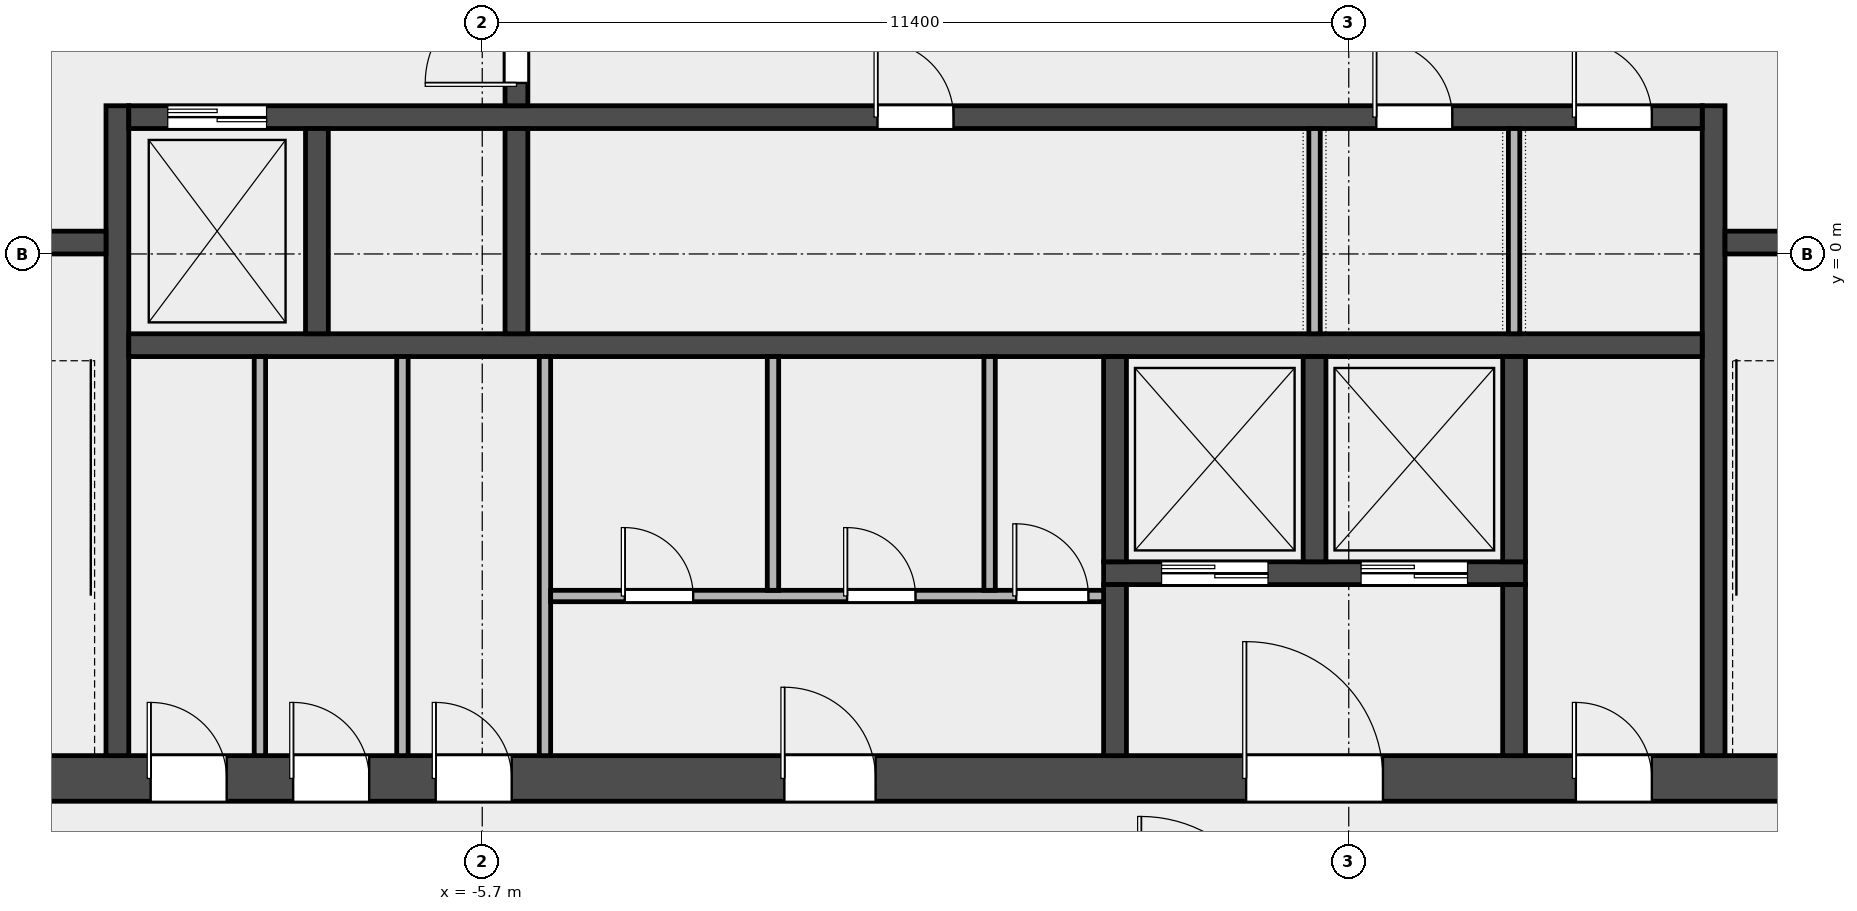
"""IFC4 building model, lengths in metres.
Left out: names, types, materials, properties, quantities, classifications, styles, units other than length and angle.
Written with IfcOpenShell. Run it as: python <this file> out.ifc"""

import sys

from ifc_helpers import new_model, si_unit, direction, frame, frame_2d, origin, place, context, subcontext, project, spatial, rectangle, extrude, element, fill, save


model = new_model("IFC4")
c1 = context("Model", 3, precision=1e-05, world=origin(), true_north=direction((0.0, 1.0)))
c2 = subcontext(c1, "Body", "Model", "MODEL_VIEW")
j1 = project(units=[si_unit("LENGTHUNIT", "METRE"), si_unit("PLANEANGLEUNIT", "RADIAN")], contexts=[c1])
p1 = place(None, origin())
s1 = spatial("IfcSite", under=j1, at=p1, CompositionType="ELEMENT")
p2 = place(p1, origin())
s2 = spatial("IfcBuilding", under=s1, at=p2, CompositionType="ELEMENT")
p3 = place(p2, frame((0.0, 0.0, 223.0)))
s3 = spatial("IfcBuildingStorey", under=s2, at=p3, CompositionType="ELEMENT", Elevation=223.0)
p4 = place(p3, frame((-14.4, -6.9, 0.0), z_axis=(0.0, 0.0, 1.0), x_axis=(1.0, 0.0, 0.0)))
e1 = element("IfcWall", 1, at=p4, inside=s3, PredefinedType="SHEAR", context=c2, shape_type="SweptSolid", body=[
    extrude(rectangle(XDim=28.8, YDim=0.6, at=frame_2d((14.4, 0.0))), origin(), (0.0, 0.0, 1.0), 3.7),
])
p5 = place(p4, frame((4.337, 0.0, 0.0)))
e2 = element("IfcOpeningElement", 2, at=p5, cuts=e1, PredefinedType="OPENING", context=c2, shape_type="SweptSolid", body=[
    extrude(rectangle(XDim=1.0, YDim=2.1, at=frame_2d((0.5, 1.05))), frame((0.0, 0.312, 0.0), z_axis=(0.0, -1.0, 0.0), x_axis=(1.0, 0.0, 0.0)), (0.0, 0.0, 1.0), 0.624),
])
p6 = place(p4, frame((6.212, 0.0, 0.0)))
e3 = element("IfcOpeningElement", 3, at=p6, cuts=e1, PredefinedType="OPENING", context=c2, shape_type="SweptSolid", body=[
    extrude(rectangle(XDim=1.0, YDim=2.1, at=frame_2d((0.5, 1.05))), frame((0.0, 0.312, 0.0), z_axis=(0.0, -1.0, 0.0), x_axis=(1.0, 0.0, 0.0)), (0.0, 0.0, 1.0), 0.624),
])
p7 = place(p4, frame((8.087, 0.0, 0.0)))
e4 = element("IfcOpeningElement", 4, at=p7, cuts=e1, PredefinedType="OPENING", context=c2, shape_type="SweptSolid", body=[
    extrude(rectangle(XDim=1.0, YDim=2.1, at=frame_2d((0.5, 1.05))), frame((0.0, 0.312, 0.0), z_axis=(0.0, -1.0, 0.0), x_axis=(1.0, 0.0, 0.0)), (0.0, 0.0, 1.0), 0.624),
])
p8 = place(p4, frame((12.675, 0.0, 0.0)))
e5 = element("IfcOpeningElement", 5, at=p8, cuts=e1, PredefinedType="OPENING", context=c2, shape_type="SweptSolid", body=[
    extrude(rectangle(XDim=1.2, YDim=2.1, at=frame_2d((0.6, 1.05))), frame((0.0, 0.312, 0.0), z_axis=(0.0, -1.0, 0.0), x_axis=(1.0, 0.0, 0.0)), (0.0, 0.0, 1.0), 0.624),
])
p9 = place(p4, frame((18.75, 0.0, 0.0)))
e6 = element("IfcOpeningElement", 6, at=p9, cuts=e1, PredefinedType="OPENING", context=c2, shape_type="SweptSolid", body=[
    extrude(rectangle(XDim=1.8, YDim=2.1, at=frame_2d((0.9, 1.05))), frame((0.0, 0.312, 0.0), z_axis=(0.0, -1.0, 0.0), x_axis=(1.0, 0.0, 0.0)), (0.0, 0.0, 1.0), 0.624),
])
p10 = place(p4, frame((23.087, 0.0, 0.0)))
e7 = element("IfcOpeningElement", 7, at=p10, cuts=e1, PredefinedType="OPENING", context=c2, shape_type="SweptSolid", body=[
    extrude(rectangle(XDim=1.0, YDim=2.1, at=frame_2d((0.5, 1.05))), frame((0.0, 0.312, 0.0), z_axis=(0.0, -1.0, 0.0), x_axis=(1.0, 0.0, 0.0)), (0.0, 0.0, 1.0), 0.624),
])
for number, where, z_axis, x_axis in (
    (8, (-10.5, -6.6, 0.0), (0.0, 0.0, 1.0), (0.0, 1.0, 0.0)),
    (9, (10.5, -6.6, 0.0), (0.0, 0.0, 1.0), (0.0, 1.0, 0.0)),
):
    element("IfcWall", number, at=place(p3, frame(where, z_axis=z_axis, x_axis=x_axis)), inside=s3, PredefinedType="SHEAR", context=c2, shape_type="SweptSolid", body=[
        extrude(rectangle(XDim=8.55, YDim=0.3, at=frame_2d((4.275, 0.0))), origin(), (0.0, 0.0, 1.0), 3.7),
    ])
p11 = place(p3, frame((-13.8, 0.15, 0.0), z_axis=(0.0, 0.0, 1.0), x_axis=(1.0, 0.0, 0.0)))
e10 = element("IfcWall", 10, at=p11, inside=s3, PredefinedType="SOLIDWALL", context=c2, shape_type="SweptSolid", body=[
    extrude(rectangle(XDim=3.15, YDim=0.3, at=frame_2d((1.575, 0.0))), origin(), (0.0, 0.0, 1.0), 3.7),
])
p12 = place(p11, frame((0.975, 0.0, 0.0)))
e11 = element("IfcOpeningElement", 11, at=p12, cuts=e10, PredefinedType="OPENING", context=c2, shape_type="SweptSolid", body=[
    extrude(rectangle(XDim=1.1, YDim=2.1, at=frame_2d((0.55, 1.05))), frame((0.0, 0.162, 0.0), z_axis=(0.0, -1.0, 0.0), x_axis=(1.0, 0.0, 0.0)), (0.0, 0.0, 1.0), 0.324),
])
p13 = place(p3, frame((10.65, 0.15, 0.0), z_axis=(0.0, 0.0, 1.0), x_axis=(1.0, 0.0, 0.0)))
e12 = element("IfcWall", 12, at=p13, inside=s3, PredefinedType="SOLIDWALL", context=c2, shape_type="SweptSolid", body=[
    extrude(rectangle(XDim=3.15, YDim=0.3, at=frame_2d((1.575, 0.0))), origin(), (0.0, 0.0, 1.0), 3.7),
])
p14 = place(p13, frame((1.025, 0.0, 0.0)))
e13 = element("IfcOpeningElement", 13, at=p14, cuts=e12, PredefinedType="OPENING", context=c2, shape_type="SweptSolid", body=[
    extrude(rectangle(XDim=1.1, YDim=2.1, at=frame_2d((0.55, 1.05))), frame((0.0, 0.162, 0.0), z_axis=(0.0, -1.0, 0.0), x_axis=(1.0, 0.0, 0.0)), (0.0, 0.0, 1.0), 0.324),
])
p15 = place(p3, frame((-10.35, -1.2, 0.0), z_axis=(0.0, 0.0, 1.0), x_axis=(1.0, 0.0, 0.0)))
e14 = element("IfcWall", 14, at=p15, inside=s3, PredefinedType="SOLIDWALL", context=c2, shape_type="SweptSolid", body=[
    extrude(rectangle(XDim=20.7, YDim=0.3, at=frame_2d((10.35, 0.0))), origin(), (0.0, 0.0, 1.0), 3.7),
])
p16 = place(p3, frame((-10.35, 1.8, 0.0), z_axis=(0.0, 0.0, 1.0), x_axis=(1.0, 0.0, 0.0)))
e15 = element("IfcWall", 15, at=p16, inside=s3, PredefinedType="SOLIDWALL", context=c2, shape_type="SweptSolid", body=[
    extrude(rectangle(XDim=20.7, YDim=0.3, at=frame_2d((10.35, 0.0))), origin(), (0.0, 0.0, 1.0), 3.7),
])
p17 = place(p16, frame((0.512, 0.0, 0.0)))
e16 = element("IfcOpeningElement", 16, at=p17, cuts=e15, PredefinedType="OPENING", context=c2, shape_type="SweptSolid", body=[
    extrude(rectangle(XDim=1.3, YDim=2.1, at=frame_2d((0.65, 1.05))), frame((0.0, 0.162, 0.0), z_axis=(0.0, -1.0, 0.0), x_axis=(1.0, 0.0, 0.0)), (0.0, 0.0, 1.0), 0.324),
])
p18 = place(p16, frame((9.85, 0.0, 0.0)))
e17 = element("IfcOpeningElement", 17, at=p18, cuts=e15, PredefinedType="OPENING", context=c2, shape_type="SweptSolid", body=[
    extrude(rectangle(XDim=1.0, YDim=2.1, at=frame_2d((0.5, 1.05))), frame((0.0, 0.162, 0.0), z_axis=(0.0, -1.0, 0.0), x_axis=(1.0, 0.0, 0.0)), (0.0, 0.0, 1.0), 0.324),
])
p19 = place(p16, frame((16.413, 0.0, 0.0)))
e18 = element("IfcOpeningElement", 18, at=p19, cuts=e15, PredefinedType="OPENING", context=c2, shape_type="SweptSolid", body=[
    extrude(rectangle(XDim=1.0, YDim=2.1, at=frame_2d((0.5, 1.05))), frame((0.0, 0.162, 0.0), z_axis=(0.0, -1.0, 0.0), x_axis=(1.0, 0.0, 0.0)), (0.0, 0.0, 1.0), 0.324),
])
p20 = place(p16, frame((19.038, 0.0, 0.0)))
e19 = element("IfcOpeningElement", 19, at=p20, cuts=e15, PredefinedType="OPENING", context=c2, shape_type="SweptSolid", body=[
    extrude(rectangle(XDim=1.0, YDim=2.1, at=frame_2d((0.5, 1.05))), frame((0.0, 0.162, 0.0), z_axis=(0.0, -1.0, 0.0), x_axis=(1.0, 0.0, 0.0)), (0.0, 0.0, 1.0), 0.324),
])
for number, where, z_axis, x_axis in (
    (20, (-7.875, -1.05, 0.0), (0.0, 0.0, 1.0), (0.0, 1.0, 0.0)),
    (21, (-5.25, -1.05, 0.0), (0.0, 0.0, 1.0), (0.0, 1.0, 0.0)),
):
    element("IfcWall", number, at=place(p3, frame(where, z_axis=z_axis, x_axis=x_axis)), inside=s3, PredefinedType="SOLIDWALL", context=c2, shape_type="SweptSolid", body=[
        extrude(rectangle(XDim=2.7, YDim=0.3, at=frame_2d((1.35, 0.0))), origin(), (0.0, 0.0, 1.0), 3.7),
    ])
p21 = place(p3, frame((-5.25, 1.95, 0.0), z_axis=(0.0, 0.0, 1.0), x_axis=(0.0, 1.0, 0.0)))
e22 = element("IfcWall", 22, at=p21, inside=s3, PredefinedType="SOLIDWALL", context=c2, shape_type="SweptSolid", body=[
    extrude(rectangle(XDim=3.3, YDim=0.3, at=frame_2d((1.65, 0.0))), origin(), (0.0, 0.0, 1.0), 3.7),
])
p22 = place(p21, frame((0.3, 0.0, 0.0)))
e23 = element("IfcOpeningElement", 23, at=p22, cuts=e22, PredefinedType="OPENING", context=c2, shape_type="SweptSolid", body=[
    extrude(rectangle(XDim=1.2, YDim=2.1, at=frame_2d((0.6, 1.05))), frame((0.0, 0.162, 0.0), z_axis=(0.0, -1.0, 0.0), x_axis=(1.0, 0.0, 0.0)), (0.0, 0.0, 1.0), 0.324),
])
p23 = place(p21, frame((1.8, 0.0, 0.0)))
e24 = element("IfcOpeningElement", 24, at=p23, cuts=e22, PredefinedType="OPENING", context=c2, shape_type="SweptSolid", body=[
    extrude(rectangle(XDim=1.2, YDim=2.1, at=frame_2d((0.6, 1.05))), frame((0.0, 0.162, 0.0), z_axis=(0.0, -1.0, 0.0), x_axis=(1.0, 0.0, 0.0)), (0.0, 0.0, 1.0), 0.324),
])
p24 = place(p3, frame((2.475, -4.2, 0.0), z_axis=(0.0, 0.0, 1.0), x_axis=(1.0, 0.0, 0.0)))
e25 = element("IfcWall", 25, at=p24, inside=s3, PredefinedType="SOLIDWALL", context=c2, shape_type="SweptSolid", body=[
    extrude(rectangle(XDim=5.55, YDim=0.3, at=frame_2d((2.775, 0.0))), origin(), (0.0, 0.0, 1.0), 3.7),
])
p25 = place(p24, frame((0.762, 0.0, 0.0)))
e26 = element("IfcOpeningElement", 26, at=p25, cuts=e25, PredefinedType="OPENING", context=c2, shape_type="SweptSolid", body=[
    extrude(rectangle(XDim=1.4, YDim=2.1, at=frame_2d((0.7, 1.05))), frame((0.0, 0.162, 0.0), z_axis=(0.0, -1.0, 0.0), x_axis=(1.0, 0.0, 0.0)), (0.0, 0.0, 1.0), 0.324),
])
p26 = place(p24, frame((3.387, 0.0, 0.0)))
e27 = element("IfcOpeningElement", 27, at=p26, cuts=e25, PredefinedType="OPENING", context=c2, shape_type="SweptSolid", body=[
    extrude(rectangle(XDim=1.4, YDim=2.1, at=frame_2d((0.7, 1.05))), frame((0.0, 0.162, 0.0), z_axis=(0.0, -1.0, 0.0), x_axis=(1.0, 0.0, 0.0)), (0.0, 0.0, 1.0), 0.324),
])
p27 = place(p3, frame((2.625, -4.05, 0.0), z_axis=(0.0, 0.0, 1.0), x_axis=(0.0, 1.0, 0.0)))
e28 = element("IfcWall", 28, at=p27, inside=s3, PredefinedType="SOLIDWALL", context=c2, shape_type="SweptSolid", body=[
    extrude(rectangle(XDim=2.7, YDim=0.3, at=frame_2d((1.35, 0.0))), origin(), (0.0, 0.0, 1.0), 3.7),
])
p28 = place(p3, frame((2.625, -6.6, 0.0), z_axis=(0.0, 0.0, 1.0), x_axis=(0.0, 1.0, 0.0)))
e29 = element("IfcWall", 29, at=p28, inside=s3, PredefinedType="SOLIDWALL", context=c2, shape_type="SweptSolid", body=[
    extrude(rectangle(XDim=2.25, YDim=0.3, at=frame_2d((1.125, 0.0))), origin(), (0.0, 0.0, 1.0), 3.7),
])
for number, where, z_axis, x_axis in (
    (30, (5.25, -4.05, 0.0), (0.0, 0.0, 1.0), (0.0, 1.0, 0.0)),
    (31, (7.875, -4.05, 0.0), (0.0, 0.0, 1.0), (0.0, 1.0, 0.0)),
):
    element("IfcWall", number, at=place(p3, frame(where, z_axis=z_axis, x_axis=x_axis)), inside=s3, PredefinedType="SOLIDWALL", context=c2, shape_type="SweptSolid", body=[
        extrude(rectangle(XDim=2.7, YDim=0.3, at=frame_2d((1.35, 0.0))), origin(), (0.0, 0.0, 1.0), 3.7),
    ])
p29 = place(p3, frame((7.875, -6.6, 0.0), z_axis=(0.0, 0.0, 1.0), x_axis=(0.0, 1.0, 0.0)))
e32 = element("IfcWall", 32, at=p29, inside=s3, PredefinedType="SOLIDWALL", context=c2, shape_type="SweptSolid", body=[
    extrude(rectangle(XDim=2.25, YDim=0.3, at=frame_2d((1.125, 0.0))), origin(), (0.0, 0.0, 1.0), 3.7),
])
for number, where, z_axis, x_axis in (
    (33, (-8.625, -6.6, 0.0), (0.0, 0.0, 1.0), (0.0, 1.0, 0.0)),
    (34, (-6.75, -6.6, 0.0), (0.0, 0.0, 1.0), (0.0, 1.0, 0.0)),
    (35, (-4.875, -6.6, 0.0), (0.0, 0.0, 1.0), (0.0, 1.0, 0.0)),
):
    element("IfcWall", number, at=place(p3, frame(where, z_axis=z_axis, x_axis=x_axis)), inside=s3, PredefinedType="PARTITIONING", context=c2, shape_type="SweptSolid", body=[
        extrude(rectangle(XDim=5.25, YDim=0.15, at=frame_2d((2.625, 0.0))), origin(), (0.0, 0.0, 1.0), 3.7),
    ])
p30 = place(p3, frame((-4.8, -4.5, 0.0), z_axis=(0.0, 0.0, 1.0), x_axis=(1.0, 0.0, 0.0)))
e36 = element("IfcWall", 36, at=p30, inside=s3, PredefinedType="PARTITIONING", context=c2, shape_type="SweptSolid", body=[
    extrude(rectangle(XDim=7.275, YDim=0.15, at=frame_2d((3.638, 0.0))), origin(), (0.0, 0.0, 1.0), 3.7),
])
p31 = place(p30, frame((0.975, 0.0, 0.0)))
e37 = element("IfcOpeningElement", 37, at=p31, cuts=e36, PredefinedType="OPENING", context=c2, shape_type="SweptSolid", body=[
    extrude(rectangle(XDim=0.9, YDim=2.1, at=frame_2d((0.45, 1.05))), frame((0.0, 0.087, 0.0), z_axis=(0.0, -1.0, 0.0), x_axis=(1.0, 0.0, 0.0)), (0.0, 0.0, 1.0), 0.174),
])
p32 = place(p30, frame((3.9, 0.0, 0.0)))
e38 = element("IfcOpeningElement", 38, at=p32, cuts=e36, PredefinedType="OPENING", context=c2, shape_type="SweptSolid", body=[
    extrude(rectangle(XDim=0.9, YDim=2.1, at=frame_2d((0.45, 1.05))), frame((0.0, 0.087, 0.0), z_axis=(0.0, -1.0, 0.0), x_axis=(1.0, 0.0, 0.0)), (0.0, 0.0, 1.0), 0.174),
])
p33 = place(p30, frame((6.125, 0.0, 0.0)))
e39 = element("IfcOpeningElement", 39, at=p33, cuts=e36, PredefinedType="OPENING", context=c2, shape_type="SweptSolid", body=[
    extrude(rectangle(XDim=0.95, YDim=2.1, at=frame_2d((0.475, 1.05))), frame((0.0, 0.087, 0.0), z_axis=(0.0, -1.0, 0.0), x_axis=(1.0, 0.0, 0.0)), (0.0, 0.0, 1.0), 0.174),
])
for number, where, z_axis, x_axis in (
    (40, (-1.875, -4.425, 0.0), (0.0, 0.0, 1.0), (0.0, 1.0, 0.0)),
    (41, (0.975, -4.425, 0.0), (0.0, 0.0, 1.0), (0.0, 1.0, 0.0)),
):
    element("IfcWall", number, at=place(p3, frame(where, z_axis=z_axis, x_axis=x_axis)), inside=s3, PredefinedType="PARTITIONING", context=c2, shape_type="SweptSolid", body=[
        extrude(rectangle(XDim=3.075, YDim=0.15, at=frame_2d((1.538, 0.0))), origin(), (0.0, 0.0, 1.0), 3.7),
    ])
for number, where, z_axis, x_axis in (
    (42, (5.25, -1.05, 0.0), (0.0, 0.0, 1.0), (0.0, 1.0, 0.0)),
    (43, (7.875, -1.05, 0.0), (0.0, 0.0, 1.0), (0.0, 1.0, 0.0)),
):
    element("IfcWall", number, at=place(p3, frame(where, z_axis=z_axis, x_axis=x_axis)), inside=s3, PredefinedType="PARTITIONING", context=c2, shape_type="SweptSolid", body=[
        extrude(rectangle(XDim=2.7, YDim=0.15, at=frame_2d((1.35, 0.0))), origin(), (0.0, 0.0, 1.0), 3.7),
    ])
p34 = place(p22, origin())
e44 = element("IfcDoor", 44, at=p34, inside=s3, OperationType="SINGLE_SWING_LEFT", PredefinedType="DOOR", context=c2, shape_type="SweptSolid", body=[
    extrude(rectangle(XDim=1.2, YDim=2.1, at=frame_2d((0.6, 1.05))), frame((0.0, 0.025, 0.0), z_axis=(0.0, -1.0, 0.0), x_axis=(1.0, 0.0, 0.0)), (0.0, 0.0, 1.0), 0.05),
])
fill(e23, e44)
p35 = place(p17, origin())
e45 = element("IfcDoor", 45, at=p35, inside=s3, OperationType="DOUBLE_DOOR_SLIDING", PredefinedType="DOOR", context=c2, shape_type="SweptSolid", body=[
    extrude(rectangle(XDim=1.3, YDim=2.1, at=frame_2d((0.65, 1.05))), frame((0.0, 0.025, 0.0), z_axis=(0.0, -1.0, 0.0), x_axis=(1.0, 0.0, 0.0)), (0.0, 0.0, 1.0), 0.05),
])
fill(e16, e45)
p36 = place(p25, origin())
e46 = element("IfcDoor", 46, at=p36, inside=s3, OperationType="DOUBLE_DOOR_SLIDING", PredefinedType="DOOR", context=c2, shape_type="SweptSolid", body=[
    extrude(rectangle(XDim=1.4, YDim=2.1, at=frame_2d((0.7, 1.05))), frame((0.0, 0.025, 0.0), z_axis=(0.0, -1.0, 0.0), x_axis=(1.0, 0.0, 0.0)), (0.0, 0.0, 1.0), 0.05),
])
fill(e26, e46)
p37 = place(p26, origin())
e47 = element("IfcDoor", 47, at=p37, inside=s3, OperationType="DOUBLE_DOOR_SLIDING", PredefinedType="DOOR", context=c2, shape_type="SweptSolid", body=[
    extrude(rectangle(XDim=1.4, YDim=2.1, at=frame_2d((0.7, 1.05))), frame((0.0, 0.025, 0.0), z_axis=(0.0, -1.0, 0.0), x_axis=(1.0, 0.0, 0.0)), (0.0, 0.0, 1.0), 0.05),
])
fill(e27, e47)
p38 = place(p5, origin())
e48 = element("IfcDoor", 48, at=p38, inside=s3, OperationType="SINGLE_SWING_LEFT", PredefinedType="DOOR", context=c2, shape_type="SweptSolid", body=[
    extrude(rectangle(XDim=1.0, YDim=2.1, at=frame_2d((0.5, 1.05))), frame((0.0, 0.025, 0.0), z_axis=(0.0, -1.0, 0.0), x_axis=(1.0, 0.0, 0.0)), (0.0, 0.0, 1.0), 0.05),
])
fill(e2, e48)
p39 = place(p6, origin())
e49 = element("IfcDoor", 49, at=p39, inside=s3, OperationType="SINGLE_SWING_LEFT", PredefinedType="DOOR", context=c2, shape_type="SweptSolid", body=[
    extrude(rectangle(XDim=1.0, YDim=2.1, at=frame_2d((0.5, 1.05))), frame((0.0, 0.025, 0.0), z_axis=(0.0, -1.0, 0.0), x_axis=(1.0, 0.0, 0.0)), (0.0, 0.0, 1.0), 0.05),
])
fill(e3, e49)
p40 = place(p7, origin())
e50 = element("IfcDoor", 50, at=p40, inside=s3, OperationType="SINGLE_SWING_LEFT", PredefinedType="DOOR", context=c2, shape_type="SweptSolid", body=[
    extrude(rectangle(XDim=1.0, YDim=2.1, at=frame_2d((0.5, 1.05))), frame((0.0, 0.025, 0.0), z_axis=(0.0, -1.0, 0.0), x_axis=(1.0, 0.0, 0.0)), (0.0, 0.0, 1.0), 0.05),
])
fill(e4, e50)
p41 = place(p8, origin())
e51 = element("IfcDoor", 51, at=p41, inside=s3, OperationType="SINGLE_SWING_LEFT", PredefinedType="DOOR", context=c2, shape_type="SweptSolid", body=[
    extrude(rectangle(XDim=1.2, YDim=2.1, at=frame_2d((0.6, 1.05))), frame((0.0, 0.025, 0.0), z_axis=(0.0, -1.0, 0.0), x_axis=(1.0, 0.0, 0.0)), (0.0, 0.0, 1.0), 0.05),
])
fill(e5, e51)
p42 = place(p31, origin())
e52 = element("IfcDoor", 52, at=p42, inside=s3, OperationType="SINGLE_SWING_LEFT", PredefinedType="DOOR", context=c2, shape_type="SweptSolid", body=[
    extrude(rectangle(XDim=0.9, YDim=2.1, at=frame_2d((0.45, 1.05))), frame((0.0, 0.025, 0.0), z_axis=(0.0, -1.0, 0.0), x_axis=(1.0, 0.0, 0.0)), (0.0, 0.0, 1.0), 0.05),
])
fill(e37, e52)
p43 = place(p32, origin())
e53 = element("IfcDoor", 53, at=p43, inside=s3, OperationType="SINGLE_SWING_LEFT", PredefinedType="DOOR", context=c2, shape_type="SweptSolid", body=[
    extrude(rectangle(XDim=0.9, YDim=2.1, at=frame_2d((0.45, 1.05))), frame((0.0, 0.025, 0.0), z_axis=(0.0, -1.0, 0.0), x_axis=(1.0, 0.0, 0.0)), (0.0, 0.0, 1.0), 0.05),
])
fill(e38, e53)
p44 = place(p33, origin())
e54 = element("IfcDoor", 54, at=p44, inside=s3, OperationType="SINGLE_SWING_LEFT", PredefinedType="DOOR", context=c2, shape_type="SweptSolid", body=[
    extrude(rectangle(XDim=0.95, YDim=2.1, at=frame_2d((0.475, 1.05))), frame((0.0, 0.025, 0.0), z_axis=(0.0, -1.0, 0.0), x_axis=(1.0, 0.0, 0.0)), (0.0, 0.0, 1.0), 0.05),
])
fill(e39, e54)
p45 = place(p9, origin())
e55 = element("IfcDoor", 55, at=p45, inside=s3, OperationType="DOUBLE_DOOR_SINGLE_SWING", PredefinedType="DOOR", context=c2, shape_type="SweptSolid", body=[
    extrude(rectangle(XDim=1.8, YDim=2.1, at=frame_2d((0.9, 1.05))), frame((0.0, 0.025, 0.0), z_axis=(0.0, -1.0, 0.0), x_axis=(1.0, 0.0, 0.0)), (0.0, 0.0, 1.0), 0.05),
])
fill(e6, e55)
p46 = place(p10, origin())
e56 = element("IfcDoor", 56, at=p46, inside=s3, OperationType="SINGLE_SWING_LEFT", PredefinedType="DOOR", context=c2, shape_type="SweptSolid", body=[
    extrude(rectangle(XDim=1.0, YDim=2.1, at=frame_2d((0.5, 1.05))), frame((0.0, 0.025, 0.0), z_axis=(0.0, -1.0, 0.0), x_axis=(1.0, 0.0, 0.0)), (0.0, 0.0, 1.0), 0.05),
])
fill(e7, e56)
p47 = place(p18, origin())
e57 = element("IfcDoor", 57, at=p47, inside=s3, OperationType="SINGLE_SWING_LEFT", PredefinedType="DOOR", context=c2, shape_type="SweptSolid", body=[
    extrude(rectangle(XDim=1.0, YDim=2.1, at=frame_2d((0.5, 1.05))), frame((0.0, 0.025, 0.0), z_axis=(0.0, -1.0, 0.0), x_axis=(1.0, 0.0, 0.0)), (0.0, 0.0, 1.0), 0.05),
])
fill(e17, e57)
p48 = place(p19, origin())
e58 = element("IfcDoor", 58, at=p48, inside=s3, OperationType="SINGLE_SWING_LEFT", PredefinedType="DOOR", context=c2, shape_type="SweptSolid", body=[
    extrude(rectangle(XDim=1.0, YDim=2.1, at=frame_2d((0.5, 1.05))), frame((0.0, 0.025, 0.0), z_axis=(0.0, -1.0, 0.0), x_axis=(1.0, 0.0, 0.0)), (0.0, 0.0, 1.0), 0.05),
])
fill(e18, e58)
p49 = place(p20, origin())
e59 = element("IfcDoor", 59, at=p49, inside=s3, OperationType="SINGLE_SWING_LEFT", PredefinedType="DOOR", context=c2, shape_type="SweptSolid", body=[
    extrude(rectangle(XDim=1.0, YDim=2.1, at=frame_2d((0.5, 1.05))), frame((0.0, 0.025, 0.0), z_axis=(0.0, -1.0, 0.0), x_axis=(1.0, 0.0, 0.0)), (0.0, 0.0, 1.0), 0.05),
])
fill(e19, e59)
save(model, sys.argv[1])
